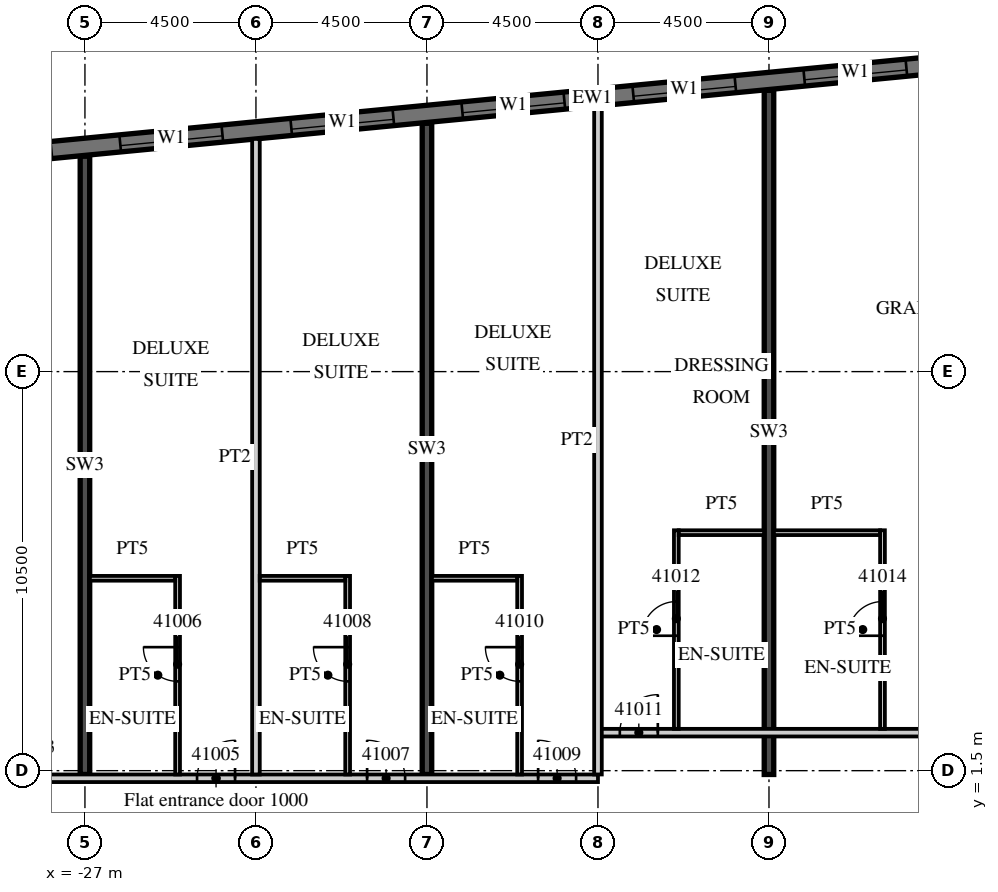
"""IFC4 building model, lengths in metres.
Left out: names, types, materials, properties, quantities, classifications, styles, units other than length and angle.
Written with IfcOpenShell. Run it as: python <this file> out.ifc"""

import sys

from ifc_helpers import new_model, si_unit, direction, frame, frame_2d, origin, place, context, subcontext, project, spatial, rectangle, extrude, element, fill, save


model = new_model("IFC4")
c1 = context("Model", 3, precision=1e-05, world=origin(), true_north=direction((0.0, 1.0)))
c2 = subcontext(c1, "Body", "Model", "MODEL_VIEW")
j1 = project(units=[si_unit("LENGTHUNIT", "METRE"), si_unit("PLANEANGLEUNIT", "RADIAN")], contexts=[c1])
p1 = place(None, origin())
s1 = spatial("IfcSite", under=j1, at=p1, CompositionType="ELEMENT")
p2 = place(p1, origin())
s2 = spatial("IfcBuilding", under=s1, at=p2, CompositionType="ELEMENT")
p3 = place(p2, frame((0.0, 0.0, 176.8)))
s3 = spatial("IfcBuildingStorey", under=s2, at=p3, CompositionType="ELEMENT", Elevation=176.8)
p4 = place(p3, frame((-27.0, 1.4, 0.0), z_axis=(0.0, 0.0, 1.0), x_axis=(0.0, 1.0, 0.0)))
e1 = element("IfcWall", 1, at=p4, inside=s3, PredefinedType="SHEAR", context=c2, shape_type="SweptSolid", body=[
    extrude(rectangle(XDim=16.268, YDim=0.25, at=frame_2d((8.134, 0.0))), origin(), (0.0, 0.0, 1.0), 3.3),
])
p5 = place(p3, frame((-18.0, 1.4, 0.0), z_axis=(0.0, 0.0, 1.0), x_axis=(0.0, 1.0, 0.0)))
e2 = element("IfcWall", 2, at=p5, inside=s3, PredefinedType="SHEAR", context=c2, shape_type="SweptSolid", body=[
    extrude(rectangle(XDim=17.134, YDim=0.25, at=frame_2d((8.567, 0.0))), origin(), (0.0, 0.0, 1.0), 3.3),
])
p6 = place(p3, frame((-9.0, 1.4, 0.0), z_axis=(0.0, 0.0, 1.0), x_axis=(0.0, 1.0, 0.0)))
e3 = element("IfcWall", 3, at=p6, inside=s3, PredefinedType="SHEAR", context=c2, shape_type="SweptSolid", body=[
    extrude(rectangle(XDim=18.001, YDim=0.25, at=frame_2d((9.0, 0.0))), origin(), (0.0, 0.0, 1.0), 3.3),
])
p7 = place(p3, frame((13.521, 21.817, 0.0), z_axis=(0.0, 0.0, 1.0), x_axis=(-0.995396508751, -0.095842529008, 0.0)))
e4 = element("IfcWall", 4, at=p7, inside=s3, PredefinedType="SOLIDWALL", context=c2, shape_type="SweptSolid", body=[
    extrude(rectangle(XDim=54.591, YDim=0.45, at=frame_2d((27.296, 0.0))), origin(), (0.0, 0.0, 1.0), 3.02),
])
p8 = place(p7, frame((0.91, 0.0, 0.45)))
e5 = element("IfcOpeningElement", 5, at=p8, cuts=e4, PredefinedType="OPENING", context=c2, shape_type="SweptSolid", body=[
    extrude(rectangle(XDim=2.7, YDim=2.25, at=frame_2d((1.35, 1.125))), frame((0.0, 0.235, 0.0), z_axis=(0.0, -1.0, 0.0), x_axis=(1.0, 0.0, 0.0)), (0.0, 0.0, 1.0), 0.47),
])
p9 = place(p7, frame((5.431, 0.0, 0.45)))
e6 = element("IfcOpeningElement", 6, at=p9, cuts=e4, PredefinedType="OPENING", context=c2, shape_type="SweptSolid", body=[
    extrude(rectangle(XDim=2.7, YDim=2.25, at=frame_2d((1.35, 1.125))), frame((0.0, 0.235, 0.0), z_axis=(0.0, -1.0, 0.0), x_axis=(1.0, 0.0, 0.0)), (0.0, 0.0, 1.0), 0.47),
])
p10 = place(p7, frame((9.952, 0.0, 0.45)))
e7 = element("IfcOpeningElement", 7, at=p10, cuts=e4, PredefinedType="OPENING", context=c2, shape_type="SweptSolid", body=[
    extrude(rectangle(XDim=2.7, YDim=2.25, at=frame_2d((1.35, 1.125))), frame((0.0, 0.235, 0.0), z_axis=(0.0, -1.0, 0.0), x_axis=(1.0, 0.0, 0.0)), (0.0, 0.0, 1.0), 0.47),
])
p11 = place(p7, frame((14.473, 0.0, 0.45)))
e8 = element("IfcOpeningElement", 8, at=p11, cuts=e4, PredefinedType="OPENING", context=c2, shape_type="SweptSolid", body=[
    extrude(rectangle(XDim=2.7, YDim=2.25, at=frame_2d((1.35, 1.125))), frame((0.0, 0.235, 0.0), z_axis=(0.0, -1.0, 0.0), x_axis=(1.0, 0.0, 0.0)), (0.0, 0.0, 1.0), 0.47),
])
p12 = place(p7, frame((18.994, 0.0, 0.45)))
e9 = element("IfcOpeningElement", 9, at=p12, cuts=e4, PredefinedType="OPENING", context=c2, shape_type="SweptSolid", body=[
    extrude(rectangle(XDim=2.7, YDim=2.25, at=frame_2d((1.35, 1.125))), frame((0.0, 0.235, 0.0), z_axis=(0.0, -1.0, 0.0), x_axis=(1.0, 0.0, 0.0)), (0.0, 0.0, 1.0), 0.47),
])
p13 = place(p7, frame((23.514, 0.0, 0.45)))
e10 = element("IfcOpeningElement", 10, at=p13, cuts=e4, PredefinedType="OPENING", context=c2, shape_type="SweptSolid", body=[
    extrude(rectangle(XDim=2.7, YDim=2.25, at=frame_2d((1.35, 1.125))), frame((0.0, 0.235, 0.0), z_axis=(0.0, -1.0, 0.0), x_axis=(1.0, 0.0, 0.0)), (0.0, 0.0, 1.0), 0.47),
])
p14 = place(p7, frame((28.035, 0.0, 0.45)))
e11 = element("IfcOpeningElement", 11, at=p14, cuts=e4, PredefinedType="OPENING", context=c2, shape_type="SweptSolid", body=[
    extrude(rectangle(XDim=2.7, YDim=2.25, at=frame_2d((1.35, 1.125))), frame((0.0, 0.235, 0.0), z_axis=(0.0, -1.0, 0.0), x_axis=(1.0, 0.0, 0.0)), (0.0, 0.0, 1.0), 0.47),
])
p15 = place(p7, frame((32.556, 0.0, 0.45)))
e12 = element("IfcOpeningElement", 12, at=p15, cuts=e4, PredefinedType="OPENING", context=c2, shape_type="SweptSolid", body=[
    extrude(rectangle(XDim=2.7, YDim=2.25, at=frame_2d((1.35, 1.125))), frame((0.0, 0.235, 0.0), z_axis=(0.0, -1.0, 0.0), x_axis=(1.0, 0.0, 0.0)), (0.0, 0.0, 1.0), 0.47),
])
p16 = place(p7, frame((37.077, 0.0, 0.45)))
e13 = element("IfcOpeningElement", 13, at=p16, cuts=e4, PredefinedType="OPENING", context=c2, shape_type="SweptSolid", body=[
    extrude(rectangle(XDim=2.7, YDim=2.25, at=frame_2d((1.35, 1.125))), frame((0.0, 0.235, 0.0), z_axis=(0.0, -1.0, 0.0), x_axis=(1.0, 0.0, 0.0)), (0.0, 0.0, 1.0), 0.47),
])
p17 = place(p7, frame((41.598, 0.0, 0.45)))
e14 = element("IfcOpeningElement", 14, at=p17, cuts=e4, PredefinedType="OPENING", context=c2, shape_type="SweptSolid", body=[
    extrude(rectangle(XDim=2.7, YDim=2.25, at=frame_2d((1.35, 1.125))), frame((0.0, 0.235, 0.0), z_axis=(0.0, -1.0, 0.0), x_axis=(1.0, 0.0, 0.0)), (0.0, 0.0, 1.0), 0.47),
])
p18 = place(p7, frame((46.118, 0.0, 0.45)))
e15 = element("IfcOpeningElement", 15, at=p18, cuts=e4, PredefinedType="OPENING", context=c2, shape_type="SweptSolid", body=[
    extrude(rectangle(XDim=2.7, YDim=2.25, at=frame_2d((1.35, 1.125))), frame((0.0, 0.235, 0.0), z_axis=(0.0, -1.0, 0.0), x_axis=(1.0, 0.0, 0.0)), (0.0, 0.0, 1.0), 0.47),
])
p19 = place(p7, frame((50.629, 0.0, 0.45)))
e16 = element("IfcOpeningElement", 16, at=p19, cuts=e4, PredefinedType="OPENING", context=c2, shape_type="SweptSolid", body=[
    extrude(rectangle(XDim=2.7, YDim=2.25, at=frame_2d((1.35, 1.125))), frame((0.0, 0.235, 0.0), z_axis=(0.0, -1.0, 0.0), x_axis=(1.0, 0.0, 0.0)), (0.0, 0.0, 1.0), 0.47),
])
p20 = place(p3, frame((-42.913, 1.3, 0.0), z_axis=(0.0, 0.0, 1.0), x_axis=(1.0, 0.0, 0.0)))
e17 = element("IfcWall", 17, at=p20, inside=s3, PredefinedType="PARTITIONING", context=c2, shape_type="SweptSolid", body=[
    extrude(rectangle(XDim=29.413, YDim=0.2, at=frame_2d((14.707, 0.0))), origin(), (0.0, 0.0, 1.0), 3.02),
])
p21 = place(p20, frame((1.406, 0.0, 0.0)))
e18 = element("IfcOpeningElement", 18, at=p21, cuts=e17, PredefinedType="OPENING", context=c2, shape_type="SweptSolid", body=[
    extrude(rectangle(XDim=1.2, YDim=2.1, at=frame_2d((0.6, 1.05))), frame((0.0, 0.11, 0.0), z_axis=(0.0, -1.0, 0.0), x_axis=(1.0, 0.0, 0.0)), (0.0, 0.0, 1.0), 0.22),
])
p22 = place(p20, frame((12.275, 0.0, 0.0)))
e19 = element("IfcOpeningElement", 19, at=p22, cuts=e17, PredefinedType="OPENING", context=c2, shape_type="SweptSolid", body=[
    extrude(rectangle(XDim=1.2, YDim=2.1, at=frame_2d((0.6, 1.05))), frame((0.0, 0.11, 0.0), z_axis=(0.0, -1.0, 0.0), x_axis=(1.0, 0.0, 0.0)), (0.0, 0.0, 1.0), 0.22),
])
p23 = place(p20, frame((18.863, 0.0, 0.0)))
e20 = element("IfcOpeningElement", 20, at=p23, cuts=e17, PredefinedType="OPENING", context=c2, shape_type="SweptSolid", body=[
    extrude(rectangle(XDim=1.0, YDim=2.1, at=frame_2d((0.5, 1.05))), frame((0.0, 0.11, 0.0), z_axis=(0.0, -1.0, 0.0), x_axis=(1.0, 0.0, 0.0)), (0.0, 0.0, 1.0), 0.22),
])
p24 = place(p20, frame((23.338, 0.0, 0.0)))
e21 = element("IfcOpeningElement", 21, at=p24, cuts=e17, PredefinedType="OPENING", context=c2, shape_type="SweptSolid", body=[
    extrude(rectangle(XDim=1.0, YDim=2.1, at=frame_2d((0.5, 1.05))), frame((0.0, 0.11, 0.0), z_axis=(0.0, -1.0, 0.0), x_axis=(1.0, 0.0, 0.0)), (0.0, 0.0, 1.0), 0.22),
])
p25 = place(p20, frame((27.838, 0.0, 0.0)))
e22 = element("IfcOpeningElement", 22, at=p25, cuts=e17, PredefinedType="OPENING", context=c2, shape_type="SweptSolid", body=[
    extrude(rectangle(XDim=1.0, YDim=2.1, at=frame_2d((0.5, 1.05))), frame((0.0, 0.11, 0.0), z_axis=(0.0, -1.0, 0.0), x_axis=(1.0, 0.0, 0.0)), (0.0, 0.0, 1.0), 0.22),
])
p26 = place(p3, frame((-13.5, 2.5, 0.0), z_axis=(0.0, 0.0, 1.0), x_axis=(1.0, 0.0, 0.0)))
e23 = element("IfcWall", 23, at=p26, inside=s3, PredefinedType="PARTITIONING", context=c2, shape_type="SweptSolid", body=[
    extrude(rectangle(XDim=27.0, YDim=0.2, at=frame_2d((13.5, 0.0))), origin(), (0.0, 0.0, 1.0), 3.02),
])
p27 = place(p26, frame((0.575, 0.0, 0.0)))
e24 = element("IfcOpeningElement", 24, at=p27, cuts=e23, PredefinedType="OPENING", context=c2, shape_type="SweptSolid", body=[
    extrude(rectangle(XDim=1.0, YDim=2.1, at=frame_2d((0.5, 1.05))), frame((0.0, 0.11, 0.0), z_axis=(0.0, -1.0, 0.0), x_axis=(1.0, 0.0, 0.0)), (0.0, 0.0, 1.0), 0.22),
])
p28 = place(p26, frame((9.863, 0.0, 0.0)))
e25 = element("IfcOpeningElement", 25, at=p28, cuts=e23, PredefinedType="OPENING", context=c2, shape_type="SweptSolid", body=[
    extrude(rectangle(XDim=1.2, YDim=2.1, at=frame_2d((0.6, 1.05))), frame((0.0, 0.11, 0.0), z_axis=(0.0, -1.0, 0.0), x_axis=(1.0, 0.0, 0.0)), (0.0, 0.0, 1.0), 0.22),
])
p29 = place(p26, frame((15.938, 0.0, 0.0)))
e26 = element("IfcOpeningElement", 26, at=p29, cuts=e23, PredefinedType="OPENING", context=c2, shape_type="SweptSolid", body=[
    extrude(rectangle(XDim=1.2, YDim=2.1, at=frame_2d((0.6, 1.05))), frame((0.0, 0.11, 0.0), z_axis=(0.0, -1.0, 0.0), x_axis=(1.0, 0.0, 0.0)), (0.0, 0.0, 1.0), 0.22),
])
p30 = place(p26, frame((25.425, 0.0, 0.0)))
e27 = element("IfcOpeningElement", 27, at=p30, cuts=e23, PredefinedType="OPENING", context=c2, shape_type="SweptSolid", body=[
    extrude(rectangle(XDim=1.0, YDim=2.1, at=frame_2d((0.5, 1.05))), frame((0.0, 0.11, 0.0), z_axis=(0.0, -1.0, 0.0), x_axis=(1.0, 0.0, 0.0)), (0.0, 0.0, 1.0), 0.22),
])
p31 = place(p3, frame((-22.5, 1.4, 0.0), z_axis=(0.0, 0.0, 1.0), x_axis=(0.0, 1.0, 0.0)))
e28 = element("IfcWall", 28, at=p31, inside=s3, PredefinedType="PARTITIONING", context=c2, shape_type="SweptSolid", body=[
    extrude(rectangle(XDim=16.723, YDim=0.2, at=frame_2d((8.362, 0.0))), origin(), (0.0, 0.0, 1.0), 3.02),
])
p32 = place(p3, frame((-24.562, 1.4, 0.0), z_axis=(0.0, 0.0, 1.0), x_axis=(0.0, 1.0, 0.0)))
e29 = element("IfcWall", 29, at=p32, inside=s3, PredefinedType="PARTITIONING", context=c2, shape_type="SweptSolid", body=[
    extrude(rectangle(XDim=5.225, YDim=0.125, at=frame_2d((2.613, 0.0))), origin(), (0.0, 0.0, 1.0), 3.02),
])
p33 = place(p32, frame((2.45, 0.0, 0.0)))
e30 = element("IfcOpeningElement", 30, at=p33, cuts=e29, PredefinedType="OPENING", context=c2, shape_type="SweptSolid", body=[
    extrude(rectangle(XDim=0.9, YDim=2.1, at=frame_2d((0.45, 1.05))), frame((0.0, 0.073, 0.0), z_axis=(0.0, -1.0, 0.0), x_axis=(1.0, 0.0, 0.0)), (0.0, 0.0, 1.0), 0.145),
])
p34 = place(p3, frame((-26.875, 6.562, 0.0), z_axis=(0.0, 0.0, 1.0), x_axis=(1.0, 0.0, 0.0)))
e31 = element("IfcWall", 31, at=p34, inside=s3, PredefinedType="PARTITIONING", context=c2, shape_type="SweptSolid", body=[
    extrude(rectangle(XDim=2.25, YDim=0.125, at=frame_2d((1.125, 0.0))), origin(), (0.0, 0.0, 1.0), 3.02),
])
p35 = place(p3, frame((-20.087, 1.4, 0.0), z_axis=(0.0, 0.0, 1.0), x_axis=(0.0, 1.0, 0.0)))
e32 = element("IfcWall", 32, at=p35, inside=s3, PredefinedType="PARTITIONING", context=c2, shape_type="SweptSolid", body=[
    extrude(rectangle(XDim=5.225, YDim=0.125, at=frame_2d((2.613, 0.0))), origin(), (0.0, 0.0, 1.0), 3.02),
])
p36 = place(p35, frame((2.45, 0.0, 0.0)))
e33 = element("IfcOpeningElement", 33, at=p36, cuts=e32, PredefinedType="OPENING", context=c2, shape_type="SweptSolid", body=[
    extrude(rectangle(XDim=0.9, YDim=2.1, at=frame_2d((0.45, 1.05))), frame((0.0, 0.073, 0.0), z_axis=(0.0, -1.0, 0.0), x_axis=(1.0, 0.0, 0.0)), (0.0, 0.0, 1.0), 0.145),
])
p37 = place(p3, frame((-22.4, 6.562, 0.0), z_axis=(0.0, 0.0, 1.0), x_axis=(1.0, 0.0, 0.0)))
e34 = element("IfcWall", 34, at=p37, inside=s3, PredefinedType="PARTITIONING", context=c2, shape_type="SweptSolid", body=[
    extrude(rectangle(XDim=2.25, YDim=0.125, at=frame_2d((1.125, 0.0))), origin(), (0.0, 0.0, 1.0), 3.02),
])
p38 = place(p3, frame((-13.5, 1.4, 0.0), z_axis=(0.0, 0.0, 1.0), x_axis=(0.0, 1.0, 0.0)))
e35 = element("IfcWall", 35, at=p38, inside=s3, PredefinedType="PARTITIONING", context=c2, shape_type="SweptSolid", body=[
    extrude(rectangle(XDim=17.59, YDim=0.2, at=frame_2d((8.795, 0.0))), origin(), (0.0, 0.0, 1.0), 3.02),
])
p39 = place(p3, frame((-15.562, 1.4, 0.0), z_axis=(0.0, 0.0, 1.0), x_axis=(0.0, 1.0, 0.0)))
e36 = element("IfcWall", 36, at=p39, inside=s3, PredefinedType="PARTITIONING", context=c2, shape_type="SweptSolid", body=[
    extrude(rectangle(XDim=5.225, YDim=0.125, at=frame_2d((2.613, 0.0))), origin(), (0.0, 0.0, 1.0), 3.02),
])
p40 = place(p39, frame((2.45, 0.0, 0.0)))
e37 = element("IfcOpeningElement", 37, at=p40, cuts=e36, PredefinedType="OPENING", context=c2, shape_type="SweptSolid", body=[
    extrude(rectangle(XDim=0.9, YDim=2.1, at=frame_2d((0.45, 1.05))), frame((0.0, 0.073, 0.0), z_axis=(0.0, -1.0, 0.0), x_axis=(1.0, 0.0, 0.0)), (0.0, 0.0, 1.0), 0.145),
])
p41 = place(p3, frame((-17.875, 6.562, 0.0), z_axis=(0.0, 0.0, 1.0), x_axis=(1.0, 0.0, 0.0)))
e38 = element("IfcWall", 38, at=p41, inside=s3, PredefinedType="PARTITIONING", context=c2, shape_type="SweptSolid", body=[
    extrude(rectangle(XDim=2.25, YDim=0.125, at=frame_2d((1.125, 0.0))), origin(), (0.0, 0.0, 1.0), 3.02),
])
p42 = place(p3, frame((-11.438, 2.6, 0.0), z_axis=(0.0, 0.0, 1.0), x_axis=(0.0, 1.0, 0.0)))
e39 = element("IfcWall", 39, at=p42, inside=s3, PredefinedType="PARTITIONING", context=c2, shape_type="SweptSolid", body=[
    extrude(rectangle(XDim=5.225, YDim=0.125, at=frame_2d((2.612, 0.0))), origin(), (0.0, 0.0, 1.0), 3.02),
])
p43 = place(p42, frame((2.45, 0.0, 0.0)))
e40 = element("IfcOpeningElement", 40, at=p43, cuts=e39, PredefinedType="OPENING", context=c2, shape_type="SweptSolid", body=[
    extrude(rectangle(XDim=0.9, YDim=2.1, at=frame_2d((0.45, 1.05))), frame((0.0, 0.073, 0.0), z_axis=(0.0, -1.0, 0.0), x_axis=(1.0, 0.0, 0.0)), (0.0, 0.0, 1.0), 0.145),
])
p44 = place(p3, frame((-11.375, 7.762, 0.0), z_axis=(0.0, 0.0, 1.0), x_axis=(1.0, 0.0, 0.0)))
e41 = element("IfcWall", 41, at=p44, inside=s3, PredefinedType="PARTITIONING", context=c2, shape_type="SweptSolid", body=[
    extrude(rectangle(XDim=2.25, YDim=0.125, at=frame_2d((1.125, 0.0))), origin(), (0.0, 0.0, 1.0), 3.02),
])
p45 = place(p3, frame((-6.013, 2.6, 0.0), z_axis=(0.0, 0.0, 1.0), x_axis=(0.0, 1.0, 0.0)))
e42 = element("IfcWall", 42, at=p45, inside=s3, PredefinedType="PARTITIONING", context=c2, shape_type="SweptSolid", body=[
    extrude(rectangle(XDim=5.225, YDim=0.125, at=frame_2d((2.612, 0.0))), origin(), (0.0, 0.0, 1.0), 3.02),
])
p46 = place(p45, frame((2.45, 0.0, 0.0)))
e43 = element("IfcOpeningElement", 43, at=p46, cuts=e42, PredefinedType="OPENING", context=c2, shape_type="SweptSolid", body=[
    extrude(rectangle(XDim=0.9, YDim=2.1, at=frame_2d((0.45, 1.05))), frame((0.0, 0.073, 0.0), z_axis=(0.0, -1.0, 0.0), x_axis=(1.0, 0.0, 0.0)), (0.0, 0.0, 1.0), 0.145),
])
p47 = place(p3, frame((-8.875, 7.762, 0.0), z_axis=(0.0, 0.0, 1.0), x_axis=(1.0, 0.0, 0.0)))
e44 = element("IfcWall", 44, at=p47, inside=s3, PredefinedType="PARTITIONING", context=c2, shape_type="SweptSolid", body=[
    extrude(rectangle(XDim=2.8, YDim=0.125, at=frame_2d((1.4, 0.0))), origin(), (0.0, 0.0, 1.0), 3.02),
])
p48 = place(p12, origin())
e45 = element("IfcWindow", 45, at=p48, inside=s3, PartitioningType="SINGLE_PANEL", PredefinedType="WINDOW", context=c2, shape_type="SweptSolid", body=[
    extrude(rectangle(XDim=2.7, YDim=2.25, at=frame_2d((1.35, 1.125))), frame((0.0, 0.09, 0.0), z_axis=(0.0, -1.0, 0.0), x_axis=(1.0, 0.0, 0.0)), (0.0, 0.0, 1.0), 0.06),
])
fill(e9, e45)
p49 = place(p13, origin())
e46 = element("IfcWindow", 46, at=p49, inside=s3, PartitioningType="SINGLE_PANEL", PredefinedType="WINDOW", context=c2, shape_type="SweptSolid", body=[
    extrude(rectangle(XDim=2.7, YDim=2.25, at=frame_2d((1.35, 1.125))), frame((0.0, 0.09, 0.0), z_axis=(0.0, -1.0, 0.0), x_axis=(1.0, 0.0, 0.0)), (0.0, 0.0, 1.0), 0.06),
])
fill(e10, e46)
p50 = place(p14, origin())
e47 = element("IfcWindow", 47, at=p50, inside=s3, PartitioningType="SINGLE_PANEL", PredefinedType="WINDOW", context=c2, shape_type="SweptSolid", body=[
    extrude(rectangle(XDim=2.7, YDim=2.25, at=frame_2d((1.35, 1.125))), frame((0.0, 0.09, 0.0), z_axis=(0.0, -1.0, 0.0), x_axis=(1.0, 0.0, 0.0)), (0.0, 0.0, 1.0), 0.06),
])
fill(e11, e47)
p51 = place(p15, origin())
e48 = element("IfcWindow", 48, at=p51, inside=s3, PartitioningType="SINGLE_PANEL", PredefinedType="WINDOW", context=c2, shape_type="SweptSolid", body=[
    extrude(rectangle(XDim=2.7, YDim=2.25, at=frame_2d((1.35, 1.125))), frame((0.0, 0.09, 0.0), z_axis=(0.0, -1.0, 0.0), x_axis=(1.0, 0.0, 0.0)), (0.0, 0.0, 1.0), 0.06),
])
fill(e12, e48)
p52 = place(p16, origin())
e49 = element("IfcWindow", 49, at=p52, inside=s3, PartitioningType="SINGLE_PANEL", PredefinedType="WINDOW", context=c2, shape_type="SweptSolid", body=[
    extrude(rectangle(XDim=2.7, YDim=2.25, at=frame_2d((1.35, 1.125))), frame((0.0, 0.09, 0.0), z_axis=(0.0, -1.0, 0.0), x_axis=(1.0, 0.0, 0.0)), (0.0, 0.0, 1.0), 0.06),
])
fill(e13, e49)
p53 = place(p23, origin())
e50 = element("IfcDoor", 50, at=p53, inside=s3, OperationType="SINGLE_SWING_RIGHT", PredefinedType="DOOR", context=c2, shape_type="SweptSolid", body=[
    extrude(rectangle(XDim=1.0, YDim=2.1, at=frame_2d((0.5, 1.05))), frame((0.0, 0.025, 0.0), z_axis=(0.0, -1.0, 0.0), x_axis=(1.0, 0.0, 0.0)), (0.0, 0.0, 1.0), 0.05),
])
fill(e20, e50)
p54 = place(p33, origin())
e51 = element("IfcDoor", 51, at=p54, inside=s3, OperationType="SINGLE_SWING_RIGHT", PredefinedType="DOOR", context=c2, shape_type="SweptSolid", body=[
    extrude(rectangle(XDim=0.9, YDim=2.1, at=frame_2d((0.45, 1.05))), frame((0.0, 0.025, 0.0), z_axis=(0.0, -1.0, 0.0), x_axis=(1.0, 0.0, 0.0)), (0.0, 0.0, 1.0), 0.05),
])
fill(e30, e51)
p55 = place(p24, origin())
e52 = element("IfcDoor", 52, at=p55, inside=s3, OperationType="SINGLE_SWING_LEFT", PredefinedType="DOOR", context=c2, shape_type="SweptSolid", body=[
    extrude(rectangle(XDim=1.0, YDim=2.1, at=frame_2d((0.5, 1.05))), frame((0.0, 0.025, 0.0), z_axis=(0.0, -1.0, 0.0), x_axis=(1.0, 0.0, 0.0)), (0.0, 0.0, 1.0), 0.05),
])
fill(e21, e52)
p56 = place(p36, origin())
e53 = element("IfcDoor", 53, at=p56, inside=s3, OperationType="SINGLE_SWING_RIGHT", PredefinedType="DOOR", context=c2, shape_type="SweptSolid", body=[
    extrude(rectangle(XDim=0.9, YDim=2.1, at=frame_2d((0.45, 1.05))), frame((0.0, 0.025, 0.0), z_axis=(0.0, -1.0, 0.0), x_axis=(1.0, 0.0, 0.0)), (0.0, 0.0, 1.0), 0.05),
])
fill(e33, e53)
p57 = place(p25, origin())
e54 = element("IfcDoor", 54, at=p57, inside=s3, OperationType="SINGLE_SWING_LEFT", PredefinedType="DOOR", context=c2, shape_type="SweptSolid", body=[
    extrude(rectangle(XDim=1.0, YDim=2.1, at=frame_2d((0.5, 1.05))), frame((0.0, 0.025, 0.0), z_axis=(0.0, -1.0, 0.0), x_axis=(1.0, 0.0, 0.0)), (0.0, 0.0, 1.0), 0.05),
])
fill(e22, e54)
p58 = place(p40, origin())
e55 = element("IfcDoor", 55, at=p58, inside=s3, OperationType="SINGLE_SWING_RIGHT", PredefinedType="DOOR", context=c2, shape_type="SweptSolid", body=[
    extrude(rectangle(XDim=0.9, YDim=2.1, at=frame_2d((0.45, 1.05))), frame((0.0, 0.025, 0.0), z_axis=(0.0, -1.0, 0.0), x_axis=(1.0, 0.0, 0.0)), (0.0, 0.0, 1.0), 0.05),
])
fill(e37, e55)
p59 = place(p27, origin())
e56 = element("IfcDoor", 56, at=p59, inside=s3, OperationType="SINGLE_SWING_RIGHT", PredefinedType="DOOR", context=c2, shape_type="SweptSolid", body=[
    extrude(rectangle(XDim=1.0, YDim=2.1, at=frame_2d((0.5, 1.05))), frame((0.0, 0.025, 0.0), z_axis=(0.0, -1.0, 0.0), x_axis=(1.0, 0.0, 0.0)), (0.0, 0.0, 1.0), 0.05),
])
fill(e24, e56)
p60 = place(p43, origin())
e57 = element("IfcDoor", 57, at=p60, inside=s3, OperationType="SINGLE_SWING_LEFT", PredefinedType="DOOR", context=c2, shape_type="SweptSolid", body=[
    extrude(rectangle(XDim=0.9, YDim=2.1, at=frame_2d((0.45, 1.05))), frame((0.0, 0.025, 0.0), z_axis=(0.0, -1.0, 0.0), x_axis=(1.0, 0.0, 0.0)), (0.0, 0.0, 1.0), 0.05),
])
fill(e40, e57)
p61 = place(p46, origin())
e58 = element("IfcDoor", 58, at=p61, inside=s3, OperationType="SINGLE_SWING_LEFT", PredefinedType="DOOR", context=c2, shape_type="SweptSolid", body=[
    extrude(rectangle(XDim=0.9, YDim=2.1, at=frame_2d((0.45, 1.05))), frame((0.0, 0.025, 0.0), z_axis=(0.0, -1.0, 0.0), x_axis=(1.0, 0.0, 0.0)), (0.0, 0.0, 1.0), 0.05),
])
fill(e43, e58)
save(model, sys.argv[1])
